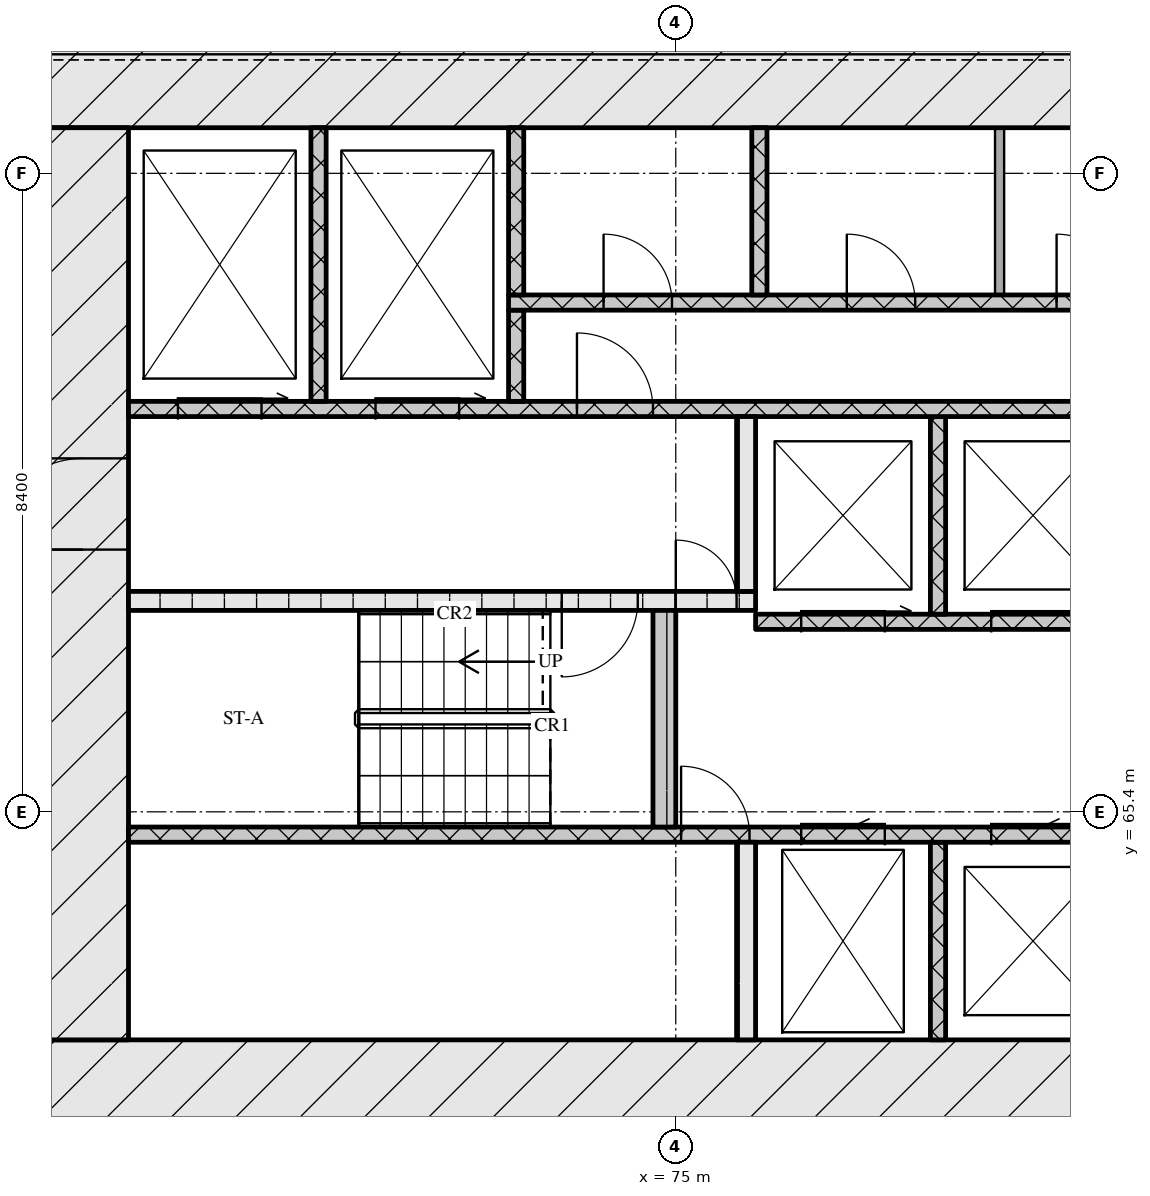
"""IFC4 building model, lengths in metres.
Left out: names, types, materials, properties, quantities, classifications, styles, units other than length and angle.
Written with IfcOpenShell. Run it as: python <this file> out.ifc"""

import sys

from ifc_helpers import new_model, si_unit, direction, frame, frame_2d, origin, place, context, subcontext, project, spatial, rectangle, extrude, element, fill, save


model = new_model("IFC4")
c1 = context("Model", 3, precision=1e-05, world=origin(), true_north=direction((0.0, 1.0)))
c2 = subcontext(c1, "Body", "Model", "MODEL_VIEW")
j1 = project(units=[si_unit("LENGTHUNIT", "METRE"), si_unit("PLANEANGLEUNIT", "RADIAN")], contexts=[c1])
p1 = place(None, origin())
s1 = spatial("IfcSite", under=j1, at=p1, CompositionType="ELEMENT")
p2 = place(p1, origin())
s2 = spatial("IfcBuilding", under=s1, at=p2, CompositionType="ELEMENT")
p3 = place(p2, frame((0.0, 0.0, 37.2)))
s3 = spatial("IfcBuildingStorey", under=s2, at=p3, CompositionType="ELEMENT", Elevation=37.2)
p4 = place(p3, frame((66.6, 61.8, 0.0), z_axis=(0.0, 0.0, 1.0), x_axis=(1.0, 0.0, 0.0)))
e1 = element("IfcWall", 1, at=p4, inside=s3, PredefinedType="SOLIDWALL", context=c2, shape_type="SweptSolid", body=[
    extrude(rectangle(XDim=42.0, YDim=1.2, at=frame_2d((21.0, 0.0))), origin(), (0.0, 0.0, 1.0), 3.32),
])
p5 = place(p4, frame((21.35, 0.0, 0.0)))
e2 = element("IfcOpeningElement", 2, at=p5, cuts=e1, PredefinedType="OPENING", context=c2, shape_type="SweptSolid", body=[
    extrude(rectangle(XDim=1.8, YDim=2.1, at=frame_2d((0.9, 1.05))), frame((0.0, 0.61, 0.0), z_axis=(0.0, -1.0, 0.0), x_axis=(1.0, 0.0, 0.0)), (0.0, 0.0, 1.0), 1.22),
])
p6 = place(p3, frame((66.6, 75.0, 0.0), z_axis=(0.0, 0.0, 1.0), x_axis=(1.0, 0.0, 0.0)))
e3 = element("IfcWall", 3, at=p6, inside=s3, PredefinedType="SOLIDWALL", context=c2, shape_type="SweptSolid", body=[
    extrude(rectangle(XDim=42.0, YDim=1.2, at=frame_2d((21.0, 0.0))), origin(), (0.0, 0.0, 1.0), 3.32),
])
p7 = place(p3, frame((67.2, 62.4, 0.0), z_axis=(0.0, 0.0, 1.0), x_axis=(0.0, 1.0, 0.0)))
e4 = element("IfcWall", 4, at=p7, inside=s3, PredefinedType="SOLIDWALL", context=c2, shape_type="SweptSolid", body=[
    extrude(rectangle(XDim=12.0, YDim=1.2, at=frame_2d((6.0, 0.0))), origin(), (0.0, 0.0, 1.0), 3.32),
])
p8 = place(p7, frame((6.45, 0.0, 0.0)))
e5 = element("IfcOpeningElement", 5, at=p8, cuts=e4, PredefinedType="OPENING", context=c2, shape_type="SweptSolid", body=[
    extrude(rectangle(XDim=1.2, YDim=2.1, at=frame_2d((0.6, 1.05))), frame((0.0, 0.61, 0.0), z_axis=(0.0, -1.0, 0.0), x_axis=(1.0, 0.0, 0.0)), (0.0, 0.0, 1.0), 1.22),
])
p9 = place(p3, frame((75.925, 62.4, 0.0), z_axis=(0.0, 0.0, 1.0), x_axis=(0.0, 1.0, 0.0)))
e6 = element("IfcWall", 6, at=p9, inside=s3, PredefinedType="SOLIDWALL", context=c2, shape_type="SweptSolid", body=[
    extrude(rectangle(XDim=2.6, YDim=0.25, at=frame_2d((1.3, 0.0))), origin(), (0.0, 0.0, 1.0), 3.32),
])
p10 = place(p3, frame((78.45, 62.4, 0.0), z_axis=(0.0, 0.0, 1.0), x_axis=(0.0, 1.0, 0.0)))
e7 = element("IfcWall", 7, at=p10, inside=s3, PredefinedType="SOLIDWALL", context=c2, shape_type="SweptSolid", body=[
    extrude(rectangle(XDim=2.6, YDim=0.2, at=frame_2d((1.3, 0.0))), origin(), (0.0, 0.0, 1.0), 3.32),
])
p11 = place(p3, frame((67.8, 65.1, 0.0), z_axis=(0.0, 0.0, 1.0), x_axis=(1.0, 0.0, 0.0)))
e8 = element("IfcWall", 8, at=p11, inside=s3, PredefinedType="SOLIDWALL", context=c2, shape_type="SweptSolid", body=[
    extrude(rectangle(XDim=18.5, YDim=0.2, at=frame_2d((9.25, 0.0))), origin(), (0.0, 0.0, 1.0), 3.32),
])
p12 = place(p11, frame((7.27, 0.0, 0.0)))
e9 = element("IfcOpeningElement", 9, at=p12, cuts=e8, PredefinedType="OPENING", context=c2, shape_type="SweptSolid", body=[
    extrude(rectangle(XDim=0.9, YDim=2.1, at=frame_2d((0.45, 1.05))), frame((0.0, 0.11, 0.0), z_axis=(0.0, -1.0, 0.0), x_axis=(1.0, 0.0, 0.0)), (0.0, 0.0, 1.0), 0.22),
])
p13 = place(p11, frame((8.85, 0.0, 0.0)))
e10 = element("IfcOpeningElement", 10, at=p13, cuts=e8, PredefinedType="OPENING", context=c2, shape_type="SweptSolid", body=[
    extrude(rectangle(XDim=1.1, YDim=2.1, at=frame_2d((0.55, 1.05))), frame((0.0, 0.11, 0.0), z_axis=(0.0, -1.0, 0.0), x_axis=(1.0, 0.0, 0.0)), (0.0, 0.0, 1.0), 0.22),
])
p14 = place(p11, frame((11.35, 0.0, 0.0)))
e11 = element("IfcOpeningElement", 11, at=p14, cuts=e8, PredefinedType="OPENING", context=c2, shape_type="SweptSolid", body=[
    extrude(rectangle(XDim=1.1, YDim=2.1, at=frame_2d((0.55, 1.05))), frame((0.0, 0.11, 0.0), z_axis=(0.0, -1.0, 0.0), x_axis=(1.0, 0.0, 0.0)), (0.0, 0.0, 1.0), 0.22),
])
p15 = place(p11, frame((13.85, 0.0, 0.0)))
e12 = element("IfcOpeningElement", 12, at=p15, cuts=e8, PredefinedType="OPENING", context=c2, shape_type="SweptSolid", body=[
    extrude(rectangle(XDim=1.1, YDim=2.1, at=frame_2d((0.55, 1.05))), frame((0.0, 0.11, 0.0), z_axis=(0.0, -1.0, 0.0), x_axis=(1.0, 0.0, 0.0)), (0.0, 0.0, 1.0), 0.22),
])
p16 = place(p11, frame((16.7, 0.0, 0.0)))
e13 = element("IfcOpeningElement", 13, at=p16, cuts=e8, PredefinedType="OPENING", context=c2, shape_type="SweptSolid", body=[
    extrude(rectangle(XDim=0.9, YDim=2.1, at=frame_2d((0.45, 1.05))), frame((0.0, 0.11, 0.0), z_axis=(0.0, -1.0, 0.0), x_axis=(1.0, 0.0, 0.0)), (0.0, 0.0, 1.0), 0.22),
])
p17 = place(p3, frame((74.85, 65.2, 0.0), z_axis=(0.0, 0.0, 1.0), x_axis=(0.0, 1.0, 0.0)))
e14 = element("IfcWall", 14, at=p17, inside=s3, PredefinedType="SOLIDWALL", context=c2, shape_type="SweptSolid", body=[
    extrude(rectangle(XDim=2.85, YDim=0.3, at=frame_2d((1.425, 0.0))), origin(), (0.0, 0.0, 1.0), 3.32),
])
p18 = place(p3, frame((76.05, 67.9, 0.0), z_axis=(0.0, 0.0, 1.0), x_axis=(1.0, 0.0, 0.0)))
e15 = element("IfcWall", 15, at=p18, inside=s3, PredefinedType="SOLIDWALL", context=c2, shape_type="SweptSolid", body=[
    extrude(rectangle(XDim=23.1, YDim=0.2, at=frame_2d((11.55, 0.0))), origin(), (0.0, 0.0, 1.0), 3.32),
])
p19 = place(p18, frame((0.6, 0.0, 0.0)))
e16 = element("IfcOpeningElement", 16, at=p19, cuts=e15, PredefinedType="OPENING", context=c2, shape_type="SweptSolid", body=[
    extrude(rectangle(XDim=1.1, YDim=2.1, at=frame_2d((0.55, 1.05))), frame((0.0, 0.11, 0.0), z_axis=(0.0, -1.0, 0.0), x_axis=(1.0, 0.0, 0.0)), (0.0, 0.0, 1.0), 0.22),
])
p20 = place(p18, frame((3.1, 0.0, 0.0)))
e17 = element("IfcOpeningElement", 17, at=p20, cuts=e15, PredefinedType="OPENING", context=c2, shape_type="SweptSolid", body=[
    extrude(rectangle(XDim=1.1, YDim=2.1, at=frame_2d((0.55, 1.05))), frame((0.0, 0.11, 0.0), z_axis=(0.0, -1.0, 0.0), x_axis=(1.0, 0.0, 0.0)), (0.0, 0.0, 1.0), 0.22),
])
p21 = place(p18, frame((5.6, 0.0, 0.0)))
e18 = element("IfcOpeningElement", 18, at=p21, cuts=e15, PredefinedType="OPENING", context=c2, shape_type="SweptSolid", body=[
    extrude(rectangle(XDim=1.1, YDim=2.1, at=frame_2d((0.55, 1.05))), frame((0.0, 0.11, 0.0), z_axis=(0.0, -1.0, 0.0), x_axis=(1.0, 0.0, 0.0)), (0.0, 0.0, 1.0), 0.22),
])
p22 = place(p18, frame((8.45, 0.0, 0.0)))
e19 = element("IfcOpeningElement", 19, at=p22, cuts=e15, PredefinedType="OPENING", context=c2, shape_type="SweptSolid", body=[
    extrude(rectangle(XDim=0.9, YDim=2.1, at=frame_2d((0.45, 1.05))), frame((0.0, 0.11, 0.0), z_axis=(0.0, -1.0, 0.0), x_axis=(1.0, 0.0, 0.0)), (0.0, 0.0, 1.0), 0.22),
])
p23 = place(p18, frame((10.91, 0.0, 0.0)))
e20 = element("IfcOpeningElement", 20, at=p23, cuts=e15, PredefinedType="OPENING", context=c2, shape_type="SweptSolid", body=[
    extrude(rectangle(XDim=0.9, YDim=2.1, at=frame_2d((0.45, 1.05))), frame((0.0, 0.11, 0.0), z_axis=(0.0, -1.0, 0.0), x_axis=(1.0, 0.0, 0.0)), (0.0, 0.0, 1.0), 0.22),
])
p24 = place(p18, frame((13.55, 0.0, 0.0)))
e21 = element("IfcOpeningElement", 21, at=p24, cuts=e15, PredefinedType="OPENING", context=c2, shape_type="SweptSolid", body=[
    extrude(rectangle(XDim=1.0, YDim=2.1, at=frame_2d((0.5, 1.05))), frame((0.0, 0.11, 0.0), z_axis=(0.0, -1.0, 0.0), x_axis=(1.0, 0.0, 0.0)), (0.0, 0.0, 1.0), 0.22),
])
p25 = place(p3, frame((78.45, 68.0, 0.0), z_axis=(0.0, 0.0, 1.0), x_axis=(0.0, 1.0, 0.0)))
e22 = element("IfcWall", 22, at=p25, inside=s3, PredefinedType="SOLIDWALL", context=c2, shape_type="SweptSolid", body=[
    extrude(rectangle(XDim=2.6, YDim=0.2, at=frame_2d((1.3, 0.0))), origin(), (0.0, 0.0, 1.0), 3.32),
])
p26 = place(p3, frame((67.8, 68.175, 0.0), z_axis=(0.0, 0.0, 1.0), x_axis=(1.0, 0.0, 0.0)))
e23 = element("IfcWall", 23, at=p26, inside=s3, PredefinedType="SOLIDWALL", context=c2, shape_type="SweptSolid", body=[
    extrude(rectangle(XDim=8.25, YDim=0.25, at=frame_2d((4.125, 0.0))), origin(), (0.0, 0.0, 1.0), 3.32),
])
p27 = place(p26, frame((5.7, 0.0, 0.0)))
e24 = element("IfcOpeningElement", 24, at=p27, cuts=e23, PredefinedType="OPENING", context=c2, shape_type="SweptSolid", body=[
    extrude(rectangle(XDim=1.0, YDim=2.1, at=frame_2d((0.5, 1.05))), frame((0.0, 0.135, 0.0), z_axis=(0.0, -1.0, 0.0), x_axis=(1.0, 0.0, 0.0)), (0.0, 0.0, 1.0), 0.27),
])
p28 = place(p26, frame((7.2, 0.0, 0.0)))
e25 = element("IfcOpeningElement", 25, at=p28, cuts=e23, PredefinedType="OPENING", context=c2, shape_type="SweptSolid", body=[
    extrude(rectangle(XDim=0.8, YDim=2.1, at=frame_2d((0.4, 1.05))), frame((0.0, 0.135, 0.0), z_axis=(0.0, -1.0, 0.0), x_axis=(1.0, 0.0, 0.0)), (0.0, 0.0, 1.0), 0.27),
])
p29 = place(p3, frame((75.925, 68.3, 0.0), z_axis=(0.0, 0.0, 1.0), x_axis=(0.0, 1.0, 0.0)))
e26 = element("IfcWall", 26, at=p29, inside=s3, PredefinedType="SOLIDWALL", context=c2, shape_type="SweptSolid", body=[
    extrude(rectangle(XDim=2.3, YDim=0.25, at=frame_2d((1.15, 0.0))), origin(), (0.0, 0.0, 1.0), 3.32),
])
p30 = place(p3, frame((67.8, 70.7, 0.0), z_axis=(0.0, 0.0, 1.0), x_axis=(1.0, 0.0, 0.0)))
e27 = element("IfcWall", 27, at=p30, inside=s3, PredefinedType="SOLIDWALL", context=c2, shape_type="SweptSolid", body=[
    extrude(rectangle(XDim=39.6, YDim=0.2, at=frame_2d((19.8, 0.0))), origin(), (0.0, 0.0, 1.0), 3.32),
])
p31 = place(p30, frame((0.65, 0.0, 0.0)))
e28 = element("IfcOpeningElement", 28, at=p31, cuts=e27, PredefinedType="OPENING", context=c2, shape_type="SweptSolid", body=[
    extrude(rectangle(XDim=1.1, YDim=2.1, at=frame_2d((0.55, 1.05))), frame((0.0, 0.11, 0.0), z_axis=(0.0, -1.0, 0.0), x_axis=(1.0, 0.0, 0.0)), (0.0, 0.0, 1.0), 0.22),
])
p32 = place(p30, frame((3.25, 0.0, 0.0)))
e29 = element("IfcOpeningElement", 29, at=p32, cuts=e27, PredefinedType="OPENING", context=c2, shape_type="SweptSolid", body=[
    extrude(rectangle(XDim=1.1, YDim=2.1, at=frame_2d((0.55, 1.05))), frame((0.0, 0.11, 0.0), z_axis=(0.0, -1.0, 0.0), x_axis=(1.0, 0.0, 0.0)), (0.0, 0.0, 1.0), 0.22),
])
p33 = place(p30, frame((5.9, 0.0, 0.0)))
e30 = element("IfcOpeningElement", 30, at=p33, cuts=e27, PredefinedType="OPENING", context=c2, shape_type="SweptSolid", body=[
    extrude(rectangle(XDim=1.0, YDim=2.1, at=frame_2d((0.5, 1.05))), frame((0.0, 0.11, 0.0), z_axis=(0.0, -1.0, 0.0), x_axis=(1.0, 0.0, 0.0)), (0.0, 0.0, 1.0), 0.22),
])
p34 = place(p30, frame((21.7, 0.0, 0.0)))
e31 = element("IfcOpeningElement", 31, at=p34, cuts=e27, PredefinedType="OPENING", context=c2, shape_type="SweptSolid", body=[
    extrude(rectangle(XDim=1.0, YDim=2.1, at=frame_2d((0.5, 1.05))), frame((0.0, 0.11, 0.0), z_axis=(0.0, -1.0, 0.0), x_axis=(1.0, 0.0, 0.0)), (0.0, 0.0, 1.0), 0.22),
])
p35 = place(p30, frame((32.7, 0.0, 0.0)))
e32 = element("IfcOpeningElement", 32, at=p35, cuts=e27, PredefinedType="OPENING", context=c2, shape_type="SweptSolid", body=[
    extrude(rectangle(XDim=1.0, YDim=2.1, at=frame_2d((0.5, 1.05))), frame((0.0, 0.11, 0.0), z_axis=(0.0, -1.0, 0.0), x_axis=(1.0, 0.0, 0.0)), (0.0, 0.0, 1.0), 0.22),
])
p36 = place(p30, frame((35.25, 0.0, 0.0)))
e33 = element("IfcOpeningElement", 33, at=p36, cuts=e27, PredefinedType="OPENING", context=c2, shape_type="SweptSolid", body=[
    extrude(rectangle(XDim=1.1, YDim=2.1, at=frame_2d((0.55, 1.05))), frame((0.0, 0.11, 0.0), z_axis=(0.0, -1.0, 0.0), x_axis=(1.0, 0.0, 0.0)), (0.0, 0.0, 1.0), 0.22),
])
p37 = place(p30, frame((37.85, 0.0, 0.0)))
e34 = element("IfcOpeningElement", 34, at=p37, cuts=e27, PredefinedType="OPENING", context=c2, shape_type="SweptSolid", body=[
    extrude(rectangle(XDim=1.1, YDim=2.1, at=frame_2d((0.55, 1.05))), frame((0.0, 0.11, 0.0), z_axis=(0.0, -1.0, 0.0), x_axis=(1.0, 0.0, 0.0)), (0.0, 0.0, 1.0), 0.22),
])
p38 = place(p3, frame((70.3, 70.8, 0.0), z_axis=(0.0, 0.0, 1.0), x_axis=(0.0, 1.0, 0.0)))
e35 = element("IfcWall", 35, at=p38, inside=s3, PredefinedType="SOLIDWALL", context=c2, shape_type="SweptSolid", body=[
    extrude(rectangle(XDim=3.6, YDim=0.2, at=frame_2d((1.8, 0.0))), origin(), (0.0, 0.0, 1.0), 3.32),
])
p39 = place(p3, frame((72.9, 70.8, 0.0), z_axis=(0.0, 0.0, 1.0), x_axis=(0.0, 1.0, 0.0)))
e36 = element("IfcWall", 36, at=p39, inside=s3, PredefinedType="SOLIDWALL", context=c2, shape_type="SweptSolid", body=[
    extrude(rectangle(XDim=1.2, YDim=0.2, at=frame_2d((0.6, 0.0))), origin(), (0.0, 0.0, 1.0), 3.32),
])
p40 = place(p3, frame((72.8, 72.1, 0.0), z_axis=(0.0, 0.0, 1.0), x_axis=(1.0, 0.0, 0.0)))
e37 = element("IfcWall", 37, at=p40, inside=s3, PredefinedType="SOLIDWALL", context=c2, shape_type="SweptSolid", body=[
    extrude(rectangle(XDim=8.92, YDim=0.2, at=frame_2d((4.46, 0.0))), origin(), (0.0, 0.0, 1.0), 3.32),
])
p41 = place(p40, frame((1.25, 0.0, 0.0)))
e38 = element("IfcOpeningElement", 38, at=p41, cuts=e37, PredefinedType="OPENING", context=c2, shape_type="SweptSolid", body=[
    extrude(rectangle(XDim=0.9, YDim=2.1, at=frame_2d((0.45, 1.05))), frame((0.0, 0.11, 0.0), z_axis=(0.0, -1.0, 0.0), x_axis=(1.0, 0.0, 0.0)), (0.0, 0.0, 1.0), 0.22),
])
p42 = place(p40, frame((4.45, 0.0, 0.0)))
e39 = element("IfcOpeningElement", 39, at=p42, cuts=e37, PredefinedType="OPENING", context=c2, shape_type="SweptSolid", body=[
    extrude(rectangle(XDim=0.9, YDim=2.1, at=frame_2d((0.45, 1.05))), frame((0.0, 0.11, 0.0), z_axis=(0.0, -1.0, 0.0), x_axis=(1.0, 0.0, 0.0)), (0.0, 0.0, 1.0), 0.22),
])
p43 = place(p40, frame((7.21, 0.0, 0.0)))
e40 = element("IfcOpeningElement", 40, at=p43, cuts=e37, PredefinedType="OPENING", context=c2, shape_type="SweptSolid", body=[
    extrude(rectangle(XDim=0.9, YDim=2.1, at=frame_2d((0.45, 1.05))), frame((0.0, 0.11, 0.0), z_axis=(0.0, -1.0, 0.0), x_axis=(1.0, 0.0, 0.0)), (0.0, 0.0, 1.0), 0.22),
])
for number, where, z_axis, x_axis in (
    (41, (72.9, 72.2, 0.0), (0.0, 0.0, 1.0), (0.0, 1.0, 0.0)),
    (42, (76.1, 72.2, 0.0), (0.0, 0.0, 1.0), (0.0, 1.0, 0.0)),
):
    element("IfcWall", number, at=place(p3, frame(where, z_axis=z_axis, x_axis=x_axis)), inside=s3, PredefinedType="SOLIDWALL", context=c2, shape_type="SweptSolid", body=[
        extrude(rectangle(XDim=2.2, YDim=0.2, at=frame_2d((1.1, 0.0))), origin(), (0.0, 0.0, 1.0), 3.32),
    ])
p44 = place(p3, frame((79.26, 72.2, 0.0), z_axis=(0.0, 0.0, 1.0), x_axis=(0.0, 1.0, 0.0)))
e43 = element("IfcWall", 43, at=p44, inside=s3, PredefinedType="PARTITIONING", context=c2, shape_type="SweptSolid", body=[
    extrude(rectangle(XDim=2.2, YDim=0.12, at=frame_2d((1.1, 0.0))), origin(), (0.0, 0.0, 1.0), 3.32),
])
p45 = place(p12, origin())
e44 = element("IfcDoor", 44, at=p45, inside=s3, OperationType="SINGLE_SWING_LEFT", PredefinedType="DOOR", context=c2, shape_type="SweptSolid", body=[
    extrude(rectangle(XDim=0.9, YDim=2.1, at=frame_2d((0.45, 1.05))), frame((0.0, 0.025, 0.0), z_axis=(0.0, -1.0, 0.0), x_axis=(1.0, 0.0, 0.0)), (0.0, 0.0, 1.0), 0.05),
])
fill(e9, e44)
p46 = place(p13, origin())
e45 = element("IfcDoor", 45, at=p46, inside=s3, OperationType="SLIDING_TO_LEFT", PredefinedType="DOOR", context=c2, shape_type="SweptSolid", body=[
    extrude(rectangle(XDim=1.1, YDim=2.1, at=frame_2d((0.55, 1.05))), frame((0.0, 0.025, 0.0), z_axis=(0.0, -1.0, 0.0), x_axis=(1.0, 0.0, 0.0)), (0.0, 0.0, 1.0), 0.05),
])
fill(e10, e45)
p47 = place(p14, origin())
e46 = element("IfcDoor", 46, at=p47, inside=s3, OperationType="SLIDING_TO_LEFT", PredefinedType="DOOR", context=c2, shape_type="SweptSolid", body=[
    extrude(rectangle(XDim=1.1, YDim=2.1, at=frame_2d((0.55, 1.05))), frame((0.0, 0.025, 0.0), z_axis=(0.0, -1.0, 0.0), x_axis=(1.0, 0.0, 0.0)), (0.0, 0.0, 1.0), 0.05),
])
fill(e11, e46)
p48 = place(p19, origin())
e47 = element("IfcDoor", 47, at=p48, inside=s3, OperationType="SLIDING_TO_RIGHT", PredefinedType="DOOR", context=c2, shape_type="SweptSolid", body=[
    extrude(rectangle(XDim=1.1, YDim=2.1, at=frame_2d((0.55, 1.05))), frame((0.0, 0.025, 0.0), z_axis=(0.0, -1.0, 0.0), x_axis=(1.0, 0.0, 0.0)), (0.0, 0.0, 1.0), 0.05),
])
fill(e16, e47)
p49 = place(p20, origin())
e48 = element("IfcDoor", 48, at=p49, inside=s3, OperationType="SLIDING_TO_RIGHT", PredefinedType="DOOR", context=c2, shape_type="SweptSolid", body=[
    extrude(rectangle(XDim=1.1, YDim=2.1, at=frame_2d((0.55, 1.05))), frame((0.0, 0.025, 0.0), z_axis=(0.0, -1.0, 0.0), x_axis=(1.0, 0.0, 0.0)), (0.0, 0.0, 1.0), 0.05),
])
fill(e17, e48)
p50 = place(p27, origin())
e49 = element("IfcDoor", 49, at=p50, inside=s3, OperationType="SINGLE_SWING_RIGHT", PredefinedType="DOOR", context=c2, shape_type="SweptSolid", body=[
    extrude(rectangle(XDim=1.0, YDim=2.1, at=frame_2d((0.5, 1.05))), frame((0.0, 0.025, 0.0), z_axis=(0.0, -1.0, 0.0), x_axis=(1.0, 0.0, 0.0)), (0.0, 0.0, 1.0), 0.05),
])
fill(e24, e49)
p51 = place(p28, origin())
e50 = element("IfcDoor", 50, at=p51, inside=s3, OperationType="SINGLE_SWING_LEFT", PredefinedType="DOOR", context=c2, shape_type="SweptSolid", body=[
    extrude(rectangle(XDim=0.8, YDim=2.1, at=frame_2d((0.4, 1.05))), frame((0.0, 0.025, 0.0), z_axis=(0.0, -1.0, 0.0), x_axis=(1.0, 0.0, 0.0)), (0.0, 0.0, 1.0), 0.05),
])
fill(e25, e50)
p52 = place(p8, origin())
e51 = element("IfcDoor", 51, at=p52, inside=s3, OperationType="SINGLE_SWING_LEFT", PredefinedType="DOOR", context=c2, shape_type="SweptSolid", body=[
    extrude(rectangle(XDim=1.2, YDim=2.1, at=frame_2d((0.6, 1.05))), frame((0.0, 0.025, 0.0), z_axis=(0.0, -1.0, 0.0), x_axis=(1.0, 0.0, 0.0)), (0.0, 0.0, 1.0), 0.05),
])
fill(e5, e51)
p53 = place(p31, origin())
e52 = element("IfcDoor", 52, at=p53, inside=s3, OperationType="SLIDING_TO_RIGHT", PredefinedType="DOOR", context=c2, shape_type="SweptSolid", body=[
    extrude(rectangle(XDim=1.1, YDim=2.1, at=frame_2d((0.55, 1.05))), frame((0.0, 0.025, 0.0), z_axis=(0.0, -1.0, 0.0), x_axis=(1.0, 0.0, 0.0)), (0.0, 0.0, 1.0), 0.05),
])
fill(e28, e52)
p54 = place(p32, origin())
e53 = element("IfcDoor", 53, at=p54, inside=s3, OperationType="SLIDING_TO_RIGHT", PredefinedType="DOOR", context=c2, shape_type="SweptSolid", body=[
    extrude(rectangle(XDim=1.1, YDim=2.1, at=frame_2d((0.55, 1.05))), frame((0.0, 0.025, 0.0), z_axis=(0.0, -1.0, 0.0), x_axis=(1.0, 0.0, 0.0)), (0.0, 0.0, 1.0), 0.05),
])
fill(e29, e53)
p55 = place(p33, origin())
e54 = element("IfcDoor", 54, at=p55, inside=s3, OperationType="SINGLE_SWING_LEFT", PredefinedType="DOOR", context=c2, shape_type="SweptSolid", body=[
    extrude(rectangle(XDim=1.0, YDim=2.1, at=frame_2d((0.5, 1.05))), frame((0.0, 0.025, 0.0), z_axis=(0.0, -1.0, 0.0), x_axis=(1.0, 0.0, 0.0)), (0.0, 0.0, 1.0), 0.05),
])
fill(e30, e54)
p56 = place(p41, origin())
e55 = element("IfcDoor", 55, at=p56, inside=s3, OperationType="SINGLE_SWING_LEFT", PredefinedType="DOOR", context=c2, shape_type="SweptSolid", body=[
    extrude(rectangle(XDim=0.9, YDim=2.1, at=frame_2d((0.45, 1.05))), frame((0.0, 0.025, 0.0), z_axis=(0.0, -1.0, 0.0), x_axis=(1.0, 0.0, 0.0)), (0.0, 0.0, 1.0), 0.05),
])
fill(e38, e55)
p57 = place(p42, origin())
e56 = element("IfcDoor", 56, at=p57, inside=s3, OperationType="SINGLE_SWING_LEFT", PredefinedType="DOOR", context=c2, shape_type="SweptSolid", body=[
    extrude(rectangle(XDim=0.9, YDim=2.1, at=frame_2d((0.45, 1.05))), frame((0.0, 0.025, 0.0), z_axis=(0.0, -1.0, 0.0), x_axis=(1.0, 0.0, 0.0)), (0.0, 0.0, 1.0), 0.05),
])
fill(e39, e56)
p58 = place(p43, origin())
e57 = element("IfcDoor", 57, at=p58, inside=s3, OperationType="SINGLE_SWING_LEFT", PredefinedType="DOOR", context=c2, shape_type="SweptSolid", body=[
    extrude(rectangle(XDim=0.9, YDim=2.1, at=frame_2d((0.45, 1.05))), frame((0.0, 0.025, 0.0), z_axis=(0.0, -1.0, 0.0), x_axis=(1.0, 0.0, 0.0)), (0.0, 0.0, 1.0), 0.05),
])
fill(e40, e57)
save(model, sys.argv[1])
